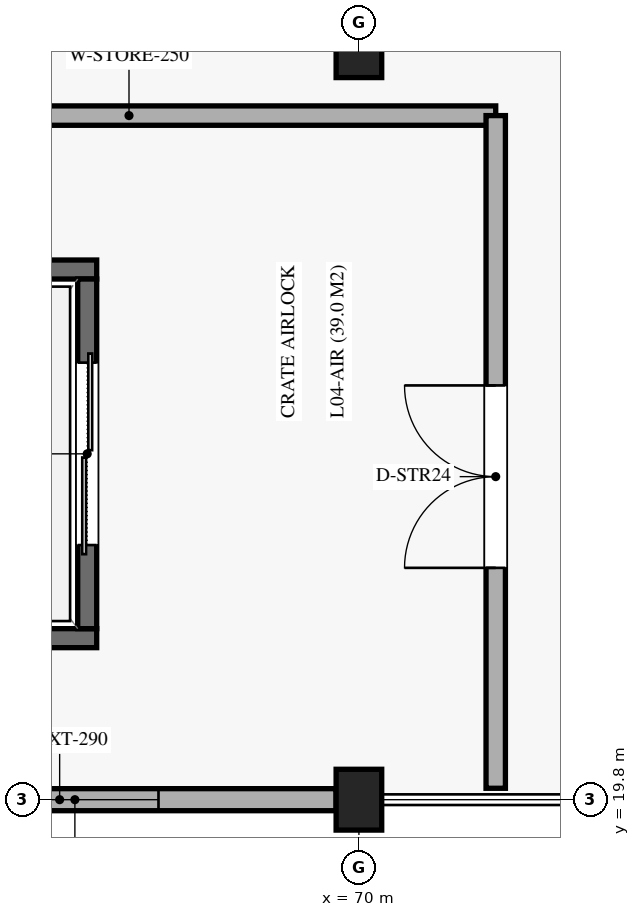
"""IFC4 building model, lengths in metres.
Left out: names, types, materials, properties, quantities, classifications, styles, units other than length and angle.
Written with IfcOpenShell. Run it as: python <this file> out.ifc"""

import sys

from ifc_helpers import new_model, si_unit, direction, frame, frame_2d, origin, origin_2d, place, context, subcontext, project, spatial, rectangle, extrude, element, fill, save


model = new_model("IFC4")
c1 = context("Model", 3, precision=1e-05, world=origin(), true_north=direction((0.0, 1.0)))
c2 = subcontext(c1, "Body", "Model", "MODEL_VIEW")
j1 = project(units=[si_unit("LENGTHUNIT", "METRE"), si_unit("PLANEANGLEUNIT", "RADIAN")], contexts=[c1])
p1 = place(None, origin())
s1 = spatial("IfcSite", under=j1, at=p1, CompositionType="ELEMENT")
p2 = place(p1, origin())
s2 = spatial("IfcBuilding", under=s1, at=p2, CompositionType="ELEMENT")
p3 = place(p2, frame((0.0, 0.0, 22.44)))
s3 = spatial("IfcBuildingStorey", under=s2, at=p3, CompositionType="ELEMENT", Elevation=22.44)
for number, where, z_axis, x_axis in (
    (1, (70.0, 19.8, 0.0), (0.0, 0.0, 1.0), (1.0, 0.0, 0.0)),
    (2, (70.0, 29.7, 0.0), (0.0, 0.0, 1.0), (1.0, 0.0, 0.0)),
):
    element("IfcColumn", number, at=place(p3, frame(where, z_axis=z_axis, x_axis=x_axis)), inside=s3, PredefinedType="COLUMN", context=c2, shape_type="SweptSolid", body=[
        extrude(rectangle(XDim=0.6, YDim=0.8, at=origin_2d()), origin(), (0.0, 0.0, 1.0), 6.12),
    ])
p4 = place(p3, frame((62.425, 19.8, 0.0), z_axis=(0.0, 0.0, 1.0), x_axis=(1.0, 0.0, 0.0)))
e3 = element("IfcWall", 3, at=p4, inside=s3, PredefinedType="SOLIDWALL", context=c2, shape_type="SweptSolid", body=[
    extrude(rectangle(XDim=7.275, YDim=0.29, at=frame_2d((3.637, 0.0))), origin(), (0.0, 0.0, 1.0), 5.06),
])
p5 = place(p4, frame((2.738, 0.0, 1.05)))
e4 = element("IfcOpeningElement", 4, at=p5, cuts=e3, PredefinedType="OPENING", context=c2, shape_type="SweptSolid", body=[
    extrude(rectangle(XDim=2.2, YDim=1.8, at=frame_2d((1.1, 0.9))), frame((0.0, 0.155, 0.0), z_axis=(0.0, -1.0, 0.0), x_axis=(1.0, 0.0, 0.0)), (0.0, 0.0, 1.0), 0.31),
])
for number, where, z_axis, x_axis in (
    (5, (62.65, 21.925, 0.0), (0.0, 0.0, 1.0), (1.0, 0.0, 0.0)),
    (6, (62.65, 26.775, 0.0), (0.0, 0.0, 1.0), (1.0, 0.0, 0.0)),
):
    element("IfcWall", number, at=place(p3, frame(where, z_axis=z_axis, x_axis=x_axis)), inside=s3, PredefinedType="SOLIDWALL", context=c2, shape_type="SweptSolid", body=[
        extrude(rectangle(XDim=3.9, YDim=0.25, at=frame_2d((1.95, 0.0))), origin(), (0.0, 0.0, 1.0), 5.82),
    ])
p6 = place(p3, frame((66.425, 22.05, 0.0), z_axis=(0.0, 0.0, 1.0), x_axis=(0.0, 1.0, 0.0)))
e7 = element("IfcWall", 7, at=p6, inside=s3, PredefinedType="SOLIDWALL", context=c2, shape_type="SweptSolid", body=[
    extrude(rectangle(XDim=4.6, YDim=0.25, at=frame_2d((2.3, 0.0))), origin(), (0.0, 0.0, 1.0), 5.82),
])
p7 = place(p6, frame((1.1, 0.0, 0.0)))
e8 = element("IfcOpeningElement", 8, at=p7, cuts=e7, PredefinedType="OPENING", context=c2, shape_type="SweptSolid", body=[
    extrude(rectangle(XDim=2.4, YDim=2.65, at=frame_2d((1.2, 1.325))), frame((0.0, 0.135, 0.0), z_axis=(0.0, -1.0, 0.0), x_axis=(1.0, 0.0, 0.0)), (0.0, 0.0, 1.0), 0.27),
])
p8 = place(p3, frame((62.15, 28.8, 0.0), z_axis=(0.0, 0.0, 1.0), x_axis=(1.0, 0.0, 0.0)))
e9 = element("IfcWall", 9, at=p8, inside=s3, PredefinedType="SOLIDWALL", context=c2, shape_type="SweptSolid", body=[
    extrude(rectangle(XDim=9.65, YDim=0.255, at=frame_2d((4.825, 0.0))), origin(), (0.0, 0.0, 1.0), 4.96),
])
p9 = place(p3, frame((71.8, 19.95, 0.0), z_axis=(0.0, 0.0, 1.0), x_axis=(0.0, 1.0, 0.0)))
e10 = element("IfcWall", 10, at=p9, inside=s3, PredefinedType="SOLIDWALL", context=c2, shape_type="SweptSolid", body=[
    extrude(rectangle(XDim=8.85, YDim=0.255, at=frame_2d((4.425, 0.0))), origin(), (0.0, 0.0, 1.0), 4.96),
])
p10 = place(p9, frame((2.9, 0.0, 0.0)))
e11 = element("IfcOpeningElement", 11, at=p10, cuts=e10, PredefinedType="OPENING", context=c2, shape_type="SweptSolid", body=[
    extrude(rectangle(XDim=2.4, YDim=2.5, at=frame_2d((1.2, 1.25))), frame((0.0, 0.137, 0.0), z_axis=(0.0, -1.0, 0.0), x_axis=(1.0, 0.0, 0.0)), (0.0, 0.0, 1.0), 0.275),
])
p11 = place(p5, origin())
e12 = element("IfcWindow", 12, at=p11, inside=s3, PartitioningType="SINGLE_PANEL", PredefinedType="WINDOW", context=c2, shape_type="SweptSolid", body=[
    extrude(rectangle(XDim=2.2, YDim=1.8, at=frame_2d((1.1, 0.9))), frame((0.0, 0.03, 0.0), z_axis=(0.0, -1.0, 0.0), x_axis=(1.0, 0.0, 0.0)), (0.0, 0.0, 1.0), 0.06),
])
fill(e4, e12)
p12 = place(p7, origin())
e13 = element("IfcDoor", 13, at=p12, inside=s3, OperationType="DOUBLE_DOOR_SLIDING", PredefinedType="DOOR", context=c2, shape_type="SweptSolid", body=[
    extrude(rectangle(XDim=2.4, YDim=2.65, at=frame_2d((1.2, 1.325))), frame((0.0, 0.025, 0.0), z_axis=(0.0, -1.0, 0.0), x_axis=(1.0, 0.0, 0.0)), (0.0, 0.0, 1.0), 0.05),
])
fill(e8, e13)
p13 = place(p10, origin())
e14 = element("IfcDoor", 14, at=p13, inside=s3, OperationType="DOUBLE_DOOR_SINGLE_SWING", PredefinedType="DOOR", context=c2, shape_type="SweptSolid", body=[
    extrude(rectangle(XDim=2.4, YDim=2.5, at=frame_2d((1.2, 1.25))), frame((0.0, 0.025, 0.0), z_axis=(0.0, -1.0, 0.0), x_axis=(1.0, 0.0, 0.0)), (0.0, 0.0, 1.0), 0.05),
])
fill(e11, e14)
save(model, sys.argv[1])
